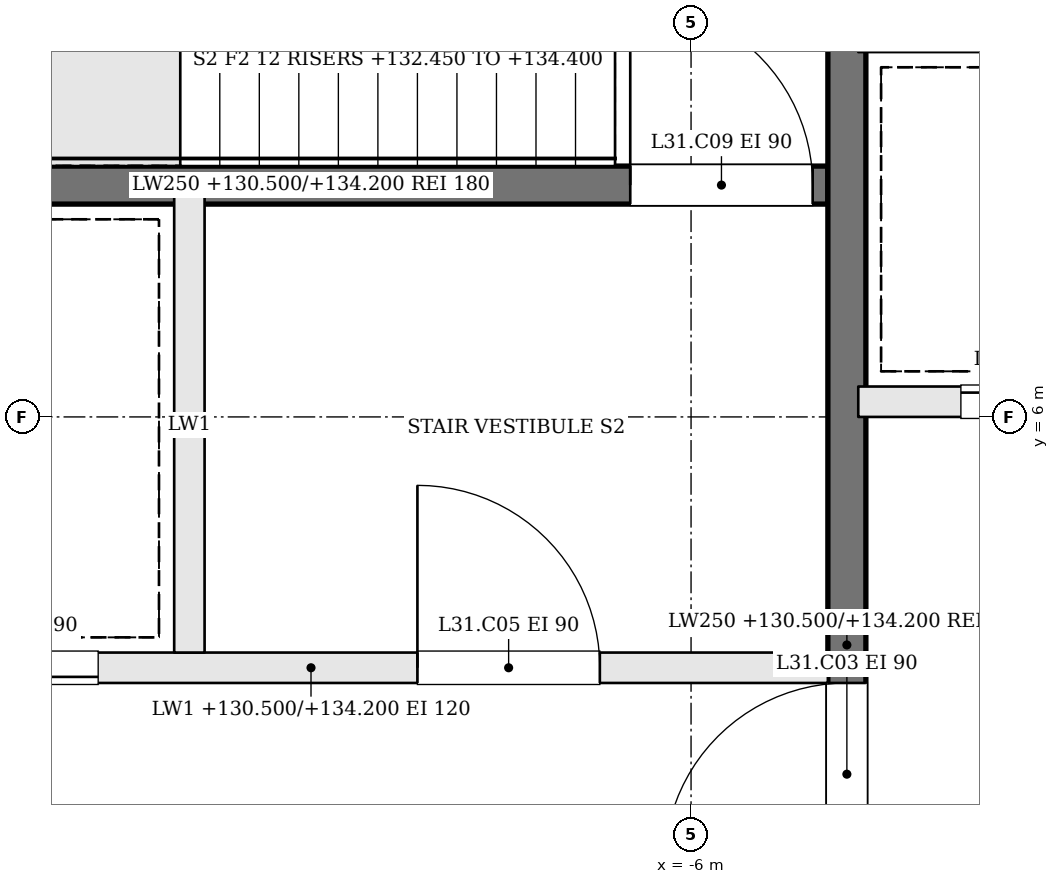
"""IFC4 building model, lengths in metres.
Left out: names, types, materials, properties, quantities, classifications, styles, units other than length and angle.
Written with IfcOpenShell. Run it as: python <this file> out.ifc"""

import sys

from ifc_helpers import new_model, si_unit, direction, frame, frame_2d, origin, place, context, subcontext, project, spatial, rectangle, extrude, element, fill, save


model = new_model("IFC4")
c1 = context("Model", 3, precision=1e-05, world=origin(), true_north=direction((0.0, 1.0)))
c2 = subcontext(c1, "Body", "Model", "MODEL_VIEW")
j1 = project(units=[si_unit("LENGTHUNIT", "METRE"), si_unit("PLANEANGLEUNIT", "RADIAN")], contexts=[c1])
p1 = place(None, origin())
s1 = spatial("IfcSite", under=j1, at=p1, CompositionType="ELEMENT")
p2 = place(p1, origin())
s2 = spatial("IfcBuilding", under=s1, at=p2, CompositionType="ELEMENT")
p3 = place(p2, frame((0.0, 0.0, 130.5)))
s3 = spatial("IfcBuildingStorey", under=s2, at=p3, CompositionType="ELEMENT", Elevation=130.5)
p4 = place(p3, frame((-11.9, 4.35, 0.0), z_axis=(0.0, 0.0, 1.0), x_axis=(1.0, 0.0, 0.0)))
e1 = element("IfcWall", 1, at=p4, inside=s3, PredefinedType="SOLIDWALL", context=c2, shape_type="SweptSolid", body=[
    extrude(rectangle(XDim=6.8, YDim=0.2, at=frame_2d((3.4, 0.0))), origin(), (0.0, 0.0, 1.0), 3.7),
])
p5 = place(p4, frame((4.1, 0.0, 0.0)))
e2 = element("IfcOpeningElement", 2, at=p5, cuts=e1, PredefinedType="OPENING", context=c2, shape_type="SweptSolid", body=[
    extrude(rectangle(XDim=1.2, YDim=2.1, at=frame_2d((0.6, 1.05))), frame((0.0, 0.11, 0.0), z_axis=(0.0, -1.0, 0.0), x_axis=(1.0, 0.0, 0.0)), (0.0, 0.0, 1.0), 0.22),
])
p6 = place(p4, frame((0.8, 0.0, 0.0)))
e3 = element("IfcOpeningElement", 3, at=p6, cuts=e1, PredefinedType="OPENING", context=c2, shape_type="SweptSolid", body=[
    extrude(rectangle(XDim=1.2, YDim=2.1, at=frame_2d((0.6, 1.05))), frame((0.0, 0.11, 0.0), z_axis=(0.0, -1.0, 0.0), x_axis=(1.0, 0.0, 0.0)), (0.0, 0.0, 1.0), 0.22),
])
p7 = place(p3, frame((-11.9, 7.525, 0.0), z_axis=(0.0, 0.0, 1.0), x_axis=(1.0, 0.0, 0.0)))
e4 = element("IfcWall", 4, at=p7, inside=s3, PredefinedType="SOLIDWALL", context=c2, shape_type="SweptSolid", body=[
    extrude(rectangle(XDim=6.8, YDim=0.25, at=frame_2d((3.4, 0.0))), origin(), (0.0, 0.0, 1.0), 3.7),
])
p8 = place(p7, frame((5.5, 0.0, 0.0)))
e5 = element("IfcOpeningElement", 5, at=p8, cuts=e4, PredefinedType="OPENING", context=c2, shape_type="SweptSolid", body=[
    extrude(rectangle(XDim=1.2, YDim=2.1, at=frame_2d((0.6, 1.05))), frame((0.0, 0.135, 0.0), z_axis=(0.0, -1.0, 0.0), x_axis=(1.0, 0.0, 0.0)), (0.0, 0.0, 1.0), 0.27),
])
p9 = place(p3, frame((-9.3, 4.45, 0.0), z_axis=(0.0, 0.0, 1.0), x_axis=(0.0, 1.0, 0.0)))
e6 = element("IfcWall", 6, at=p9, inside=s3, PredefinedType="SOLIDWALL", context=c2, shape_type="SweptSolid", body=[
    extrude(rectangle(XDim=3.0, YDim=0.2, at=frame_2d((1.5, 0.0))), origin(), (0.0, 0.0, 1.0), 3.7),
])
p10 = place(p3, frame((-4.975, -1.9, 0.0), z_axis=(0.0, 0.0, 1.0), x_axis=(0.0, 1.0, 0.0)))
e7 = element("IfcWall", 7, at=p10, inside=s3, PredefinedType="SOLIDWALL", context=c2, shape_type="SweptSolid", body=[
    extrude(rectangle(XDim=12.8, YDim=0.25, at=frame_2d((6.4, 0.0))), origin(), (0.0, 0.0, 1.0), 3.7),
])
p11 = place(p10, frame((4.95, 0.0, 0.0)))
e8 = element("IfcOpeningElement", 8, at=p11, cuts=e7, PredefinedType="OPENING", context=c2, shape_type="SweptSolid", body=[
    extrude(rectangle(XDim=1.2, YDim=2.1, at=frame_2d((0.6, 1.05))), frame((0.0, 0.135, 0.0), z_axis=(0.0, -1.0, 0.0), x_axis=(1.0, 0.0, 0.0)), (0.0, 0.0, 1.0), 0.27),
])
p12 = place(p3, frame((-4.9, 6.1, 0.0), z_axis=(0.0, 0.0, 1.0), x_axis=(1.0, 0.0, 0.0)))
e9 = element("IfcWall", 9, at=p12, inside=s3, PredefinedType="SOLIDWALL", context=c2, shape_type="SweptSolid", body=[
    extrude(rectangle(XDim=9.8, YDim=0.2, at=frame_2d((4.9, 0.0))), origin(), (0.0, 0.0, 1.0), 3.7),
])
p13 = place(p12, frame((0.675, 0.0, 0.0)))
e10 = element("IfcOpeningElement", 10, at=p13, cuts=e9, PredefinedType="OPENING", context=c2, shape_type="SweptSolid", body=[
    extrude(rectangle(XDim=1.1, YDim=2.1, at=frame_2d((0.55, 1.05))), frame((0.0, 0.11, 0.0), z_axis=(0.0, -1.0, 0.0), x_axis=(1.0, 0.0, 0.0)), (0.0, 0.0, 1.0), 0.22),
])
p14 = place(p12, frame((3.125, 0.0, 0.0)))
e11 = element("IfcOpeningElement", 11, at=p14, cuts=e9, PredefinedType="OPENING", context=c2, shape_type="SweptSolid", body=[
    extrude(rectangle(XDim=1.1, YDim=2.1, at=frame_2d((0.55, 1.05))), frame((0.0, 0.11, 0.0), z_axis=(0.0, -1.0, 0.0), x_axis=(1.0, 0.0, 0.0)), (0.0, 0.0, 1.0), 0.22),
])
p15 = place(p12, frame((5.575, 0.0, 0.0)))
e12 = element("IfcOpeningElement", 12, at=p15, cuts=e9, PredefinedType="OPENING", context=c2, shape_type="SweptSolid", body=[
    extrude(rectangle(XDim=1.1, YDim=2.1, at=frame_2d((0.55, 1.05))), frame((0.0, 0.11, 0.0), z_axis=(0.0, -1.0, 0.0), x_axis=(1.0, 0.0, 0.0)), (0.0, 0.0, 1.0), 0.22),
])
p16 = place(p12, frame((8.025, 0.0, 0.0)))
e13 = element("IfcOpeningElement", 13, at=p16, cuts=e9, PredefinedType="OPENING", context=c2, shape_type="SweptSolid", body=[
    extrude(rectangle(XDim=1.1, YDim=2.1, at=frame_2d((0.55, 1.05))), frame((0.0, 0.11, 0.0), z_axis=(0.0, -1.0, 0.0), x_axis=(1.0, 0.0, 0.0)), (0.0, 0.0, 1.0), 0.22),
])
p17 = place(p11, origin())
e14 = element("IfcDoor", 14, at=p17, inside=s3, OperationType="SINGLE_SWING_LEFT", PredefinedType="DOOR", context=c2, shape_type="SweptSolid", body=[
    extrude(rectangle(XDim=1.2, YDim=2.1, at=frame_2d((0.6, 1.05))), frame((0.0, 0.025, 0.0), z_axis=(0.0, -1.0, 0.0), x_axis=(1.0, 0.0, 0.0)), (0.0, 0.0, 1.0), 0.05),
])
fill(e8, e14)
p18 = place(p5, origin())
e15 = element("IfcDoor", 15, at=p18, inside=s3, OperationType="SINGLE_SWING_LEFT", PredefinedType="DOOR", context=c2, shape_type="SweptSolid", body=[
    extrude(rectangle(XDim=1.2, YDim=2.1, at=frame_2d((0.6, 1.05))), frame((0.0, 0.025, 0.0), z_axis=(0.0, -1.0, 0.0), x_axis=(1.0, 0.0, 0.0)), (0.0, 0.0, 1.0), 0.05),
])
fill(e2, e15)
p19 = place(p8, origin())
e16 = element("IfcDoor", 16, at=p19, inside=s3, OperationType="SINGLE_SWING_LEFT", PredefinedType="DOOR", context=c2, shape_type="SweptSolid", body=[
    extrude(rectangle(XDim=1.2, YDim=2.1, at=frame_2d((0.6, 1.05))), frame((0.0, 0.025, 0.0), z_axis=(0.0, -1.0, 0.0), x_axis=(1.0, 0.0, 0.0)), (0.0, 0.0, 1.0), 0.05),
])
fill(e5, e16)
p20 = place(p6, origin())
e17 = element("IfcDoor", 17, at=p20, inside=s3, OperationType="SLIDING_TO_RIGHT", PredefinedType="DOOR", context=c2, shape_type="SweptSolid", body=[
    extrude(rectangle(XDim=1.2, YDim=2.1, at=frame_2d((0.6, 1.05))), frame((0.0, 0.025, 0.0), z_axis=(0.0, -1.0, 0.0), x_axis=(1.0, 0.0, 0.0)), (0.0, 0.0, 1.0), 0.05),
])
fill(e3, e17)
p21 = place(p13, origin())
e18 = element("IfcDoor", 18, at=p21, inside=s3, OperationType="SLIDING_TO_RIGHT", PredefinedType="DOOR", context=c2, shape_type="SweptSolid", body=[
    extrude(rectangle(XDim=1.1, YDim=2.1, at=frame_2d((0.55, 1.05))), frame((0.0, 0.025, 0.0), z_axis=(0.0, -1.0, 0.0), x_axis=(1.0, 0.0, 0.0)), (0.0, 0.0, 1.0), 0.05),
])
fill(e10, e18)
save(model, sys.argv[1])
